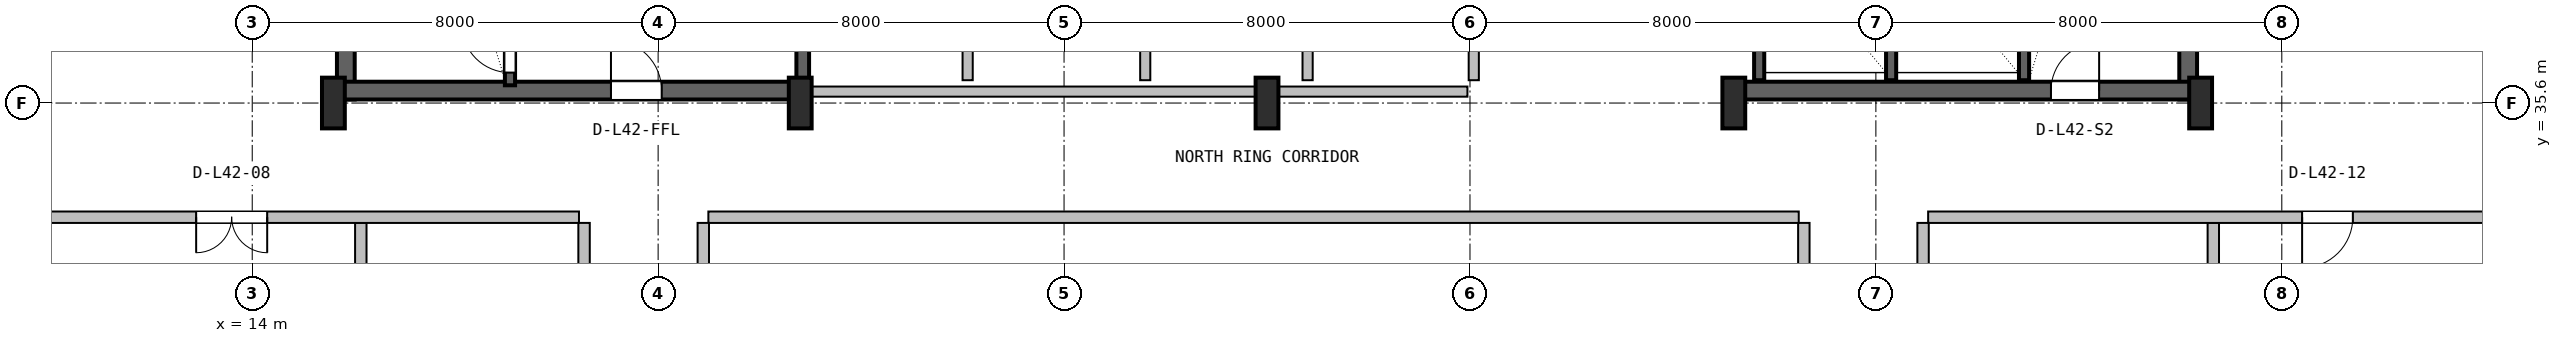
"""IFC4 building model, lengths in metres.
Left out: names, types, materials, properties, quantities, classifications, styles, units other than length and angle.
Written with IfcOpenShell. Run it as: python <this file> out.ifc"""

import sys

from ifc_helpers import new_model, si_unit, direction, frame, frame_2d, origin, origin_2d, place, context, subcontext, project, spatial, rectangle, i_section, extrude, source, transform, mapped, element, fill, save


model = new_model("IFC4")
c1 = context("Model", 3, precision=1e-05, world=origin(), true_north=direction((0.0, 1.0)))
c2 = subcontext(c1, "Body", "Model", "MODEL_VIEW")
j1 = project(units=[si_unit("LENGTHUNIT", "METRE"), si_unit("PLANEANGLEUNIT", "RADIAN")], contexts=[c1])
p1 = place(None, origin())
s1 = spatial("IfcSite", under=j1, at=p1, CompositionType="ELEMENT")
p2 = place(p1, origin())
s2 = spatial("IfcBuilding", under=s1, at=p2, CompositionType="ELEMENT")
p3 = place(p2, frame((0.0, 0.0, 172.4)))
s3 = spatial("IfcBuildingStorey", under=s2, at=p3, CompositionType="ELEMENT", Elevation=172.4)
for number, where, z_axis, x_axis in (
    (1, (15.845, 35.67, 0.0), (0.0, 0.0, 1.0), (0.0, 1.0, 0.0)),
    (2, (52.155, 35.67, 0.0), (0.0, 0.0, 1.0), (0.0, 1.0, 0.0)),
):
    element("IfcWall", number, at=place(p3, frame(where, z_axis=z_axis, x_axis=x_axis)), inside=s3, PredefinedType="SHEAR", context=c2, shape_type="SweptSolid", body=[
        extrude(rectangle(XDim=11.13, YDim=0.35, at=frame_2d((5.565, 0.0))), origin(), (0.0, 0.0, 1.0), 3.55),
    ])
p4 = place(p3, frame((15.67, 35.845, 0.0), z_axis=(0.0, 0.0, 1.0), x_axis=(1.0, 0.0, 0.0)))
e3 = element("IfcWall", 3, at=p4, inside=s3, PredefinedType="SHEAR", context=c2, shape_type="SweptSolid", body=[
    extrude(rectangle(XDim=9.13, YDim=0.35, at=frame_2d((4.565, 0.0))), origin(), (0.0, 0.0, 1.0), 3.55),
])
p5 = place(p4, frame((5.4, 0.0, 0.0)))
e4 = element("IfcOpeningElement", 4, at=p5, cuts=e3, PredefinedType="OPENING", context=c2, shape_type="SweptSolid", body=[
    extrude(rectangle(XDim=1.0, YDim=2.1, at=frame_2d((0.5, 1.05))), frame((0.0, 0.185, 0.0), z_axis=(0.0, -1.0, 0.0), x_axis=(1.0, 0.0, 0.0)), (0.0, 0.0, 1.0), 0.37),
])
p6 = place(p3, frame((43.2, 35.845, 0.0), z_axis=(0.0, 0.0, 1.0), x_axis=(1.0, 0.0, 0.0)))
e5 = element("IfcWall", 5, at=p6, inside=s3, PredefinedType="SHEAR", context=c2, shape_type="SweptSolid", body=[
    extrude(rectangle(XDim=9.13, YDim=0.35, at=frame_2d((4.565, 0.0))), origin(), (0.0, 0.0, 1.0), 3.55),
])
p7 = place(p6, frame((6.25, 0.0, 0.0)))
e6 = element("IfcOpeningElement", 6, at=p7, cuts=e5, PredefinedType="OPENING", context=c2, shape_type="SweptSolid", body=[
    extrude(rectangle(XDim=0.95, YDim=2.1, at=frame_2d((0.475, 1.05))), frame((0.0, 0.185, 0.0), z_axis=(0.0, -1.0, 0.0), x_axis=(1.0, 0.0, 0.0)), (0.0, 0.0, 1.0), 0.37),
])
m1 = source(origin(), c2, "Body", "SweptSolid", [
    extrude(i_section(OverallWidth=0.45, OverallDepth=1.0, WebThickness=0.016, FlangeThickness=0.03, FilletRadius=0.016, at=origin_2d()), origin(), (0.0, 0.0, 1.0), 3.8),
])
for number, where, z_axis, x_axis in (
    (7, (15.6, 35.6, 0.0), (0.0, 0.0, 1.0), (1.0, 0.0, 0.0)),
    (8, (24.8, 35.6, 0.0), (0.0, 0.0, 1.0), (1.0, 0.0, 0.0)),
    (9, (34.0, 35.6, 0.0), (0.0, 0.0, 1.0), (1.0, 0.0, 0.0)),
    (10, (43.2, 35.6, 0.0), (0.0, 0.0, 1.0), (1.0, 0.0, 0.0)),
    (11, (52.4, 35.6, 0.0), (0.0, 0.0, 1.0), (1.0, 0.0, 0.0)),
):
    element("IfcColumn", number, at=place(p3, frame(where, z_axis=z_axis, x_axis=x_axis)), inside=s3, PredefinedType="COLUMN", context=c2, shape_type="MappedRepresentation", body=[
        mapped(m1, transform((0.0, 0.0, 0.0), x_axis=(1.0, 0.0, 0.0), y_axis=(0.0, 1.0, 0.0), z_axis=(0.0, 0.0, 1.0), scale=1.0)),
    ])
p8 = place(p3, frame((19.08, 35.95, 0.0), z_axis=(0.0, 0.0, 1.0), x_axis=(0.0, 1.0, 0.0)))
e12 = element("IfcWall", 12, at=p8, inside=s3, PredefinedType="SHEAR", context=c2, shape_type="SweptSolid", body=[
    extrude(rectangle(XDim=9.65, YDim=0.2, at=frame_2d((4.825, 0.0))), origin(), (0.0, 0.0, 1.0), 3.55),
])
p9 = place(p8, frame((0.25, 0.0, 0.0)))
e13 = element("IfcOpeningElement", 13, at=p9, cuts=e12, PredefinedType="OPENING", context=c2, shape_type="SweptSolid", body=[
    extrude(rectangle(XDim=0.95, YDim=2.1, at=frame_2d((0.475, 1.05))), frame((0.0, 0.11, 0.0), z_axis=(0.0, -1.0, 0.0), x_axis=(1.0, 0.0, 0.0)), (0.0, 0.0, 1.0), 0.22),
])
p10 = place(p3, frame((24.85, 36.05, 0.0), z_axis=(0.0, 0.0, 1.0), x_axis=(0.0, 1.0, 0.0)))
e14 = element("IfcWall", 14, at=p10, inside=s3, PredefinedType="SHEAR", context=c2, shape_type="SweptSolid", body=[
    extrude(rectangle(XDim=10.45, YDim=0.25, at=frame_2d((5.225, 0.0))), origin(), (0.0, 0.0, 1.0), 3.55),
])
p11 = place(p3, frame((48.92, 36.05, 0.0), z_axis=(0.0, 0.0, 1.0), x_axis=(0.0, 1.0, 0.0)))
e15 = element("IfcWall", 15, at=p11, inside=s3, PredefinedType="SHEAR", context=c2, shape_type="SweptSolid", body=[
    extrude(rectangle(XDim=10.5, YDim=0.2, at=frame_2d((5.25, 0.0))), origin(), (0.0, 0.0, 1.0), 3.55),
])
for number, where, z_axis, x_axis in (
    (16, (43.7, 36.05, 0.0), (0.0, 0.0, 1.0), (0.0, 1.0, 0.0)),
    (17, (46.3, 36.05, 0.0), (0.0, 0.0, 1.0), (0.0, 1.0, 0.0)),
):
    element("IfcWall", number, at=place(p3, frame(where, z_axis=z_axis, x_axis=x_axis)), inside=s3, PredefinedType="SHEAR", context=c2, shape_type="SweptSolid", body=[
        extrude(rectangle(XDim=3.05, YDim=0.2, at=frame_2d((1.525, 0.0))), origin(), (0.0, 0.0, 1.0), 3.55),
    ])
p12 = place(p3, frame((25.0, 35.825, 0.0), z_axis=(0.0, 0.0, 1.0), x_axis=(1.0, 0.0, 0.0)))
e18 = element("IfcWall", 18, at=p12, inside=s3, PredefinedType="SOLIDWALL", context=c2, shape_type="SweptSolid", body=[
    extrude(rectangle(XDim=12.95, YDim=0.2, at=frame_2d((6.475, 0.0))), origin(), (0.0, 0.0, 1.0), 2.575),
])
for number, where, z_axis, x_axis in (
    (19, (28.1, 36.05, 0.0), (0.0, 0.0, 1.0), (0.0, 1.0, 0.0)),
    (20, (31.6, 36.05, 0.0), (0.0, 0.0, 1.0), (0.0, 1.0, 0.0)),
):
    element("IfcWall", number, at=place(p3, frame(where, z_axis=z_axis, x_axis=x_axis)), inside=s3, PredefinedType="PLUMBINGWALL", context=c2, shape_type="SweptSolid", body=[
        extrude(rectangle(XDim=3.1, YDim=0.2, at=frame_2d((1.55, 0.0))), origin(), (0.0, 0.0, 1.0), 3.53),
    ])
for number, where, z_axis, x_axis in (
    (21, (34.8, 36.05, 0.0), (0.0, 0.0, 1.0), (0.0, 1.0, 0.0)),
    (22, (38.075, 36.05, 0.0), (0.0, 0.0, 1.0), (0.0, 1.0, 0.0)),
):
    element("IfcWall", number, at=place(p3, frame(where, z_axis=z_axis, x_axis=x_axis)), inside=s3, PredefinedType="SOLIDWALL", context=c2, shape_type="SweptSolid", body=[
        extrude(rectangle(XDim=3.1, YDim=0.2, at=frame_2d((1.55, 0.0))), origin(), (0.0, 0.0, 1.0), 3.53),
    ])
p13 = place(p3, frame((16.14, 15.8, 0.0), z_axis=(0.0, 0.0, 1.0), x_axis=(0.0, 1.0, 0.0)))
e23 = element("IfcWall", 23, at=p13, inside=s3, PredefinedType="PARTITIONING", context=c2, shape_type="SweptSolid", body=[
    extrude(rectangle(XDim=17.438, YDim=0.225, at=frame_2d((8.719, 0.0))), origin(), (0.0, 0.0, 1.0), 3.222),
])
p14 = place(p3, frame((7.18, 33.35, 0.0), z_axis=(0.0, 0.0, 1.0), x_axis=(1.0, 0.0, 0.0)))
e24 = element("IfcWall", 24, at=p14, inside=s3, PredefinedType="PARTITIONING", context=c2, shape_type="SweptSolid", body=[
    extrude(rectangle(XDim=13.26, YDim=0.225, at=frame_2d((6.63, 0.0))), origin(), (0.0, 0.0, 1.0), 3.108),
])
p15 = place(p14, frame((5.715, 0.0, 0.0)))
e25 = element("IfcOpeningElement", 25, at=p15, cuts=e24, PredefinedType="OPENING", context=c2, shape_type="SweptSolid", body=[
    extrude(rectangle(XDim=1.4, YDim=2.12, at=frame_2d((0.7, 1.06))), frame((0.0, 0.123, 0.0), z_axis=(0.0, -1.0, 0.0), x_axis=(1.0, 0.0, 0.0)), (0.0, 0.0, 1.0), 0.245),
])
p16 = place(p3, frame((20.54, 15.8, 0.0), z_axis=(0.0, 0.0, 1.0), x_axis=(0.0, 1.0, 0.0)))
e26 = element("IfcWall", 26, at=p16, inside=s3, PredefinedType="PARTITIONING", context=c2, shape_type="SweptSolid", body=[
    extrude(rectangle(XDim=17.438, YDim=0.225, at=frame_2d((8.719, 0.0))), origin(), (0.0, 0.0, 1.0), 3.222),
])
p17 = place(p16, frame((8.034, 0.0, 0.0)))
e27 = element("IfcOpeningElement", 27, at=p17, cuts=e26, PredefinedType="OPENING", context=c2, shape_type="SweptSolid", body=[
    extrude(rectangle(XDim=1.4, YDim=2.12, at=frame_2d((0.7, 1.06))), frame((0.0, 0.123, 0.0), z_axis=(0.0, -1.0, 0.0), x_axis=(1.0, 0.0, 0.0)), (0.0, 0.0, 1.0), 0.245),
])
p18 = place(p3, frame((44.58, 18.192, 0.0), z_axis=(0.0, 0.0, 1.0), x_axis=(0.0, 1.0, 0.0)))
e28 = element("IfcWall", 28, at=p18, inside=s3, PredefinedType="PARTITIONING", context=c2, shape_type="SweptSolid", body=[
    extrude(rectangle(XDim=15.046, YDim=0.225, at=frame_2d((7.523, 0.0))), origin(), (0.0, 0.0, 1.0), 3.222),
])
p19 = place(p3, frame((22.99, 33.35, 0.0), z_axis=(0.0, 0.0, 1.0), x_axis=(1.0, 0.0, 0.0)))
e29 = element("IfcWall", 29, at=p19, inside=s3, PredefinedType="PARTITIONING", context=c2, shape_type="SweptSolid", body=[
    extrude(rectangle(XDim=21.49, YDim=0.225, at=frame_2d((10.745, 0.0))), origin(), (0.0, 0.0, 1.0), 2.909),
])
p20 = place(p3, frame((22.89, 18.192, 0.0), z_axis=(0.0, 0.0, 1.0), x_axis=(0.0, 1.0, 0.0)))
e30 = element("IfcWall", 30, at=p20, inside=s3, PredefinedType="PARTITIONING", context=c2, shape_type="SweptSolid", body=[
    extrude(rectangle(XDim=15.046, YDim=0.225, at=frame_2d((7.523, 0.0))), origin(), (0.0, 0.0, 1.0), 3.222),
])
p21 = place(p3, frame((52.65, 15.8, 0.0), z_axis=(0.0, 0.0, 1.0), x_axis=(0.0, 1.0, 0.0)))
e31 = element("IfcWall", 31, at=p21, inside=s3, PredefinedType="PARTITIONING", context=c2, shape_type="SweptSolid", body=[
    extrude(rectangle(XDim=17.438, YDim=0.225, at=frame_2d((8.719, 0.0))), origin(), (0.0, 0.0, 1.0), 3.222),
])
p22 = place(p3, frame((47.03, 33.35, 0.0), z_axis=(0.0, 0.0, 1.0), x_axis=(1.0, 0.0, 0.0)))
e32 = element("IfcWall", 32, at=p22, inside=s3, PredefinedType="PARTITIONING", context=c2, shape_type="SweptSolid", body=[
    extrude(rectangle(XDim=13.79, YDim=0.225, at=frame_2d((6.895, 0.0))), origin(), (0.0, 0.0, 1.0), 3.108),
])
p23 = place(p22, frame((7.37, 0.0, 0.0)))
e33 = element("IfcOpeningElement", 33, at=p23, cuts=e32, PredefinedType="OPENING", context=c2, shape_type="SweptSolid", body=[
    extrude(rectangle(XDim=1.0, YDim=2.1, at=frame_2d((0.5, 1.05))), frame((0.0, 0.123, 0.0), z_axis=(0.0, -1.0, 0.0), x_axis=(1.0, 0.0, 0.0)), (0.0, 0.0, 1.0), 0.245),
])
p24 = place(p3, frame((46.93, 15.8, 0.0), z_axis=(0.0, 0.0, 1.0), x_axis=(0.0, 1.0, 0.0)))
e34 = element("IfcWall", 34, at=p24, inside=s3, PredefinedType="PARTITIONING", context=c2, shape_type="SweptSolid", body=[
    extrude(rectangle(XDim=17.438, YDim=0.225, at=frame_2d((8.719, 0.0))), origin(), (0.0, 0.0, 1.0), 3.222),
])
p25 = place(p24, frame((8.274, 0.0, 0.0)))
e35 = element("IfcOpeningElement", 35, at=p25, cuts=e34, PredefinedType="OPENING", context=c2, shape_type="SweptSolid", body=[
    extrude(rectangle(XDim=0.92, YDim=2.08, at=frame_2d((0.46, 1.04))), frame((0.0, 0.123, 0.0), z_axis=(0.0, -1.0, 0.0), x_axis=(1.0, 0.0, 0.0)), (0.0, 0.0, 1.0), 0.245),
])
m2 = source(origin(), c2, "Body", "SweptSolid", [
    extrude(rectangle(XDim=0.95, YDim=2.1, at=frame_2d((0.475, 1.05))), frame((0.0, 0.025, 0.0), z_axis=(0.0, -1.0, 0.0), x_axis=(1.0, 0.0, 0.0)), (0.0, 0.0, 1.0), 0.05),
])
p26 = place(p9, origin())
e36 = element("IfcDoor", 36, at=p26, inside=s3, OperationType="SINGLE_SWING_RIGHT", PredefinedType="DOOR", context=c2, shape_type="MappedRepresentation", body=[
    mapped(m2, transform((0.0, 0.0, 0.0), x_axis=(1.0, 0.0, 0.0), y_axis=(0.0, 1.0, 0.0), z_axis=(0.0, 0.0, 1.0), scale=1.0)),
])
fill(e13, e36)
m3 = source(origin(), c2, "Body", "SweptSolid", [
    extrude(rectangle(XDim=1.0, YDim=2.1, at=frame_2d((0.5, 1.05))), frame((0.0, 0.025, 0.0), z_axis=(0.0, -1.0, 0.0), x_axis=(1.0, 0.0, 0.0)), (0.0, 0.0, 1.0), 0.05),
])
p27 = place(p5, origin())
e37 = element("IfcDoor", 37, at=p27, inside=s3, OperationType="SINGLE_SWING_LEFT", PredefinedType="DOOR", context=c2, shape_type="MappedRepresentation", body=[
    mapped(m3, transform((0.0, 0.0, 0.0), x_axis=(1.0, 0.0, 0.0), y_axis=(0.0, 1.0, 0.0), z_axis=(0.0, 0.0, 1.0), scale=1.0)),
])
fill(e4, e37)
p28 = place(p7, origin())
e38 = element("IfcDoor", 38, at=p28, inside=s3, OperationType="SINGLE_SWING_RIGHT", PredefinedType="DOOR", context=c2, shape_type="MappedRepresentation", body=[
    mapped(m2, transform((0.0, 0.0, 0.0), x_axis=(1.0, 0.0, 0.0), y_axis=(0.0, 1.0, 0.0), z_axis=(0.0, 0.0, 1.0), scale=1.0)),
])
fill(e6, e38)
m4 = source(origin(), c2, "Body", "SweptSolid", [
    extrude(rectangle(XDim=1.4, YDim=2.12, at=frame_2d((0.7, 1.06))), frame((0.0, 0.025, 0.0), z_axis=(0.0, -1.0, 0.0), x_axis=(1.0, 0.0, 0.0)), (0.0, 0.0, 1.0), 0.05),
])
p29 = place(p15, frame((1.4, 0.0, 0.0), z_axis=(0.0, 0.0, 1.0), x_axis=(-1.0, 0.0, 0.0)))
e39 = element("IfcDoor", 39, at=p29, inside=s3, OperationType="DOUBLE_DOOR_SINGLE_SWING", PredefinedType="DOOR", context=c2, shape_type="MappedRepresentation", body=[
    mapped(m4, transform((0.0, 0.0, 0.0), x_axis=(1.0, 0.0, 0.0), y_axis=(0.0, 1.0, 0.0), z_axis=(0.0, 0.0, 1.0), scale=1.0)),
])
fill(e25, e39)
m5 = source(origin(), c2, "Body", "SweptSolid", [
    extrude(rectangle(XDim=1.0, YDim=2.1, at=frame_2d((0.5, 1.05))), frame((0.0, 0.025, 0.0), z_axis=(0.0, -1.0, 0.0), x_axis=(1.0, 0.0, 0.0)), (0.0, 0.0, 1.0), 0.05),
])
p30 = place(p23, frame((1.0, 0.0, 0.0), z_axis=(0.0, 0.0, 1.0), x_axis=(-1.0, 0.0, 0.0)))
e40 = element("IfcDoor", 40, at=p30, inside=s3, OperationType="SINGLE_SWING_LEFT", PredefinedType="DOOR", context=c2, shape_type="MappedRepresentation", body=[
    mapped(m5, transform((0.0, 0.0, 0.0), x_axis=(1.0, 0.0, 0.0), y_axis=(0.0, 1.0, 0.0), z_axis=(0.0, 0.0, 1.0), scale=1.0)),
])
fill(e33, e40)
save(model, sys.argv[1])
